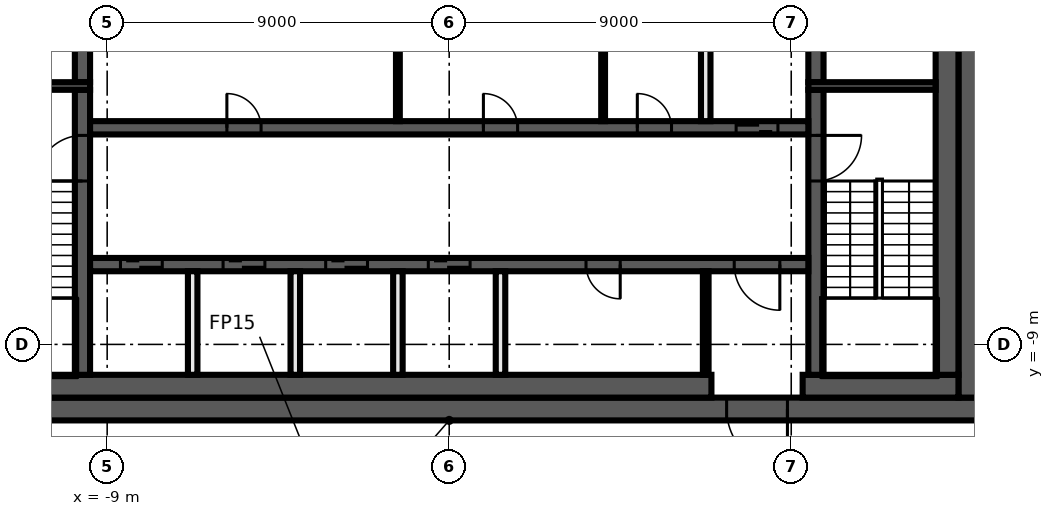
"""IFC4 building model, lengths in metres.
Left out: names, types, materials, properties, quantities, classifications, styles, units other than length and angle.
Written with IfcOpenShell. Run it as: python <this file> out.ifc"""

import sys

from ifc_helpers import new_model, si_unit, direction, frame, frame_2d, origin, place, context, subcontext, project, spatial, rectangle, extrude, element, fill, save


model = new_model("IFC4")
c1 = context("Model", 3, precision=1e-05, world=origin(), true_north=direction((0.0, 1.0)))
c2 = subcontext(c1, "Body", "Model", "MODEL_VIEW")
j1 = project(units=[si_unit("LENGTHUNIT", "METRE"), si_unit("PLANEANGLEUNIT", "RADIAN")], contexts=[c1])
p1 = place(None, origin())
s1 = spatial("IfcSite", under=j1, at=p1, CompositionType="ELEMENT")
p2 = place(p1, origin())
s2 = spatial("IfcBuilding", under=s1, at=p2, CompositionType="ELEMENT")
p3 = place(p2, frame((0.0, 0.0, 306.8)))
s3 = spatial("IfcBuildingStorey", under=s2, at=p3, CompositionType="ELEMENT", Elevation=306.8)
p4 = place(p3, frame((14.0, -10.7, 0.0), z_axis=(0.0, 0.0, 1.0), x_axis=(-1.0, 0.0, 0.0)))
e1 = element("IfcWall", 1, at=p4, inside=s3, PredefinedType="SHEAR", context=c2, shape_type="SweptSolid", body=[
    extrude(rectangle(XDim=28.0, YDim=0.6, at=frame_2d((14.0, 0.0))), origin(), (0.0, 0.0, 1.0), 3.82),
])
p5 = place(p4, frame((5.1, 0.0, 0.0)))
e2 = element("IfcOpeningElement", 2, at=p5, cuts=e1, PredefinedType="OPENING", context=c2, shape_type="SweptSolid", body=[
    extrude(rectangle(XDim=1.6, YDim=2.1, at=frame_2d((0.8, 1.05))), frame((0.0, 0.31, 0.0), z_axis=(0.0, -1.0, 0.0), x_axis=(1.0, 0.0, 0.0)), (0.0, 0.0, 1.0), 0.62),
])
p6 = place(p3, frame((13.7, 10.4, 0.0), z_axis=(0.0, 0.0, 1.0), x_axis=(0.0, -1.0, 0.0)))
e3 = element("IfcWall", 3, at=p6, inside=s3, PredefinedType="SHEAR", context=c2, shape_type="SweptSolid", body=[
    extrude(rectangle(XDim=20.8, YDim=0.6, at=frame_2d((10.4, 0.0))), origin(), (0.0, 0.0, 1.0), 3.82),
])
p7 = place(p3, frame((13.4, -10.1, 0.0), z_axis=(0.0, 0.0, 1.0), x_axis=(-1.0, 0.0, 0.0)))
e4 = element("IfcWall", 4, at=p7, inside=s3, PredefinedType="SHEAR", context=c2, shape_type="SweptSolid", body=[
    extrude(rectangle(XDim=4.1, YDim=0.6, at=frame_2d((2.05, 0.0))), origin(), (0.0, 0.0, 1.0), 3.82),
])
p8 = place(p3, frame((6.9, -10.1, 0.0), z_axis=(0.0, 0.0, 1.0), x_axis=(-1.0, 0.0, 0.0)))
e5 = element("IfcWall", 5, at=p8, inside=s3, PredefinedType="SHEAR", context=c2, shape_type="SweptSolid", body=[
    extrude(rectangle(XDim=20.3, YDim=0.6, at=frame_2d((10.15, 0.0))), origin(), (0.0, 0.0, 1.0), 3.82),
])
p9 = place(p3, frame((13.1, 9.8, 0.0), z_axis=(0.0, 0.0, 1.0), x_axis=(0.0, -1.0, 0.0)))
e6 = element("IfcWall", 6, at=p9, inside=s3, PredefinedType="SHEAR", context=c2, shape_type="SweptSolid", body=[
    extrude(rectangle(XDim=19.6, YDim=0.6, at=frame_2d((9.8, 0.0))), origin(), (0.0, 0.0, 1.0), 3.82),
])
p10 = place(p3, frame((9.65, -2.3, 0.0), z_axis=(0.0, 0.0, 1.0), x_axis=(0.0, -1.0, 0.0)))
e7 = element("IfcWall", 7, at=p10, inside=s3, PredefinedType="SHEAR", context=c2, shape_type="SweptSolid", body=[
    extrude(rectangle(XDim=7.5, YDim=0.4, at=frame_2d((3.75, 0.0))), origin(), (0.0, 0.0, 1.0), 3.82),
])
p11 = place(p10, frame((1.2, 0.0, 0.0)))
e8 = element("IfcOpeningElement", 8, at=p11, cuts=e7, PredefinedType="OPENING", context=c2, shape_type="SweptSolid", body=[
    extrude(rectangle(XDim=1.2, YDim=2.1, at=frame_2d((0.6, 1.05))), frame((0.0, 0.21, 0.0), z_axis=(0.0, -1.0, 0.0), x_axis=(1.0, 0.0, 0.0)), (0.0, 0.0, 1.0), 0.42),
])
p12 = place(p3, frame((9.65, 2.1, 0.0), z_axis=(0.0, 0.0, 1.0), x_axis=(0.0, -1.0, 0.0)))
e9 = element("IfcWall", 9, at=p12, inside=s3, PredefinedType="SHEAR", context=c2, shape_type="SweptSolid", body=[
    extrude(rectangle(XDim=4.2, YDim=0.4, at=frame_2d((2.1, 0.0))), origin(), (0.0, 0.0, 1.0), 3.82),
])
p13 = place(p12, frame((0.15, 0.0, 0.0)))
e10 = element("IfcOpeningElement", 10, at=p13, cuts=e9, PredefinedType="OPENING", context=c2, shape_type="SweptSolid", body=[
    extrude(rectangle(XDim=0.9, YDim=2.1, at=frame_2d((0.45, 1.05))), frame((0.0, 0.21, 0.0), z_axis=(0.0, -1.0, 0.0), x_axis=(1.0, 0.0, 0.0)), (0.0, 0.0, 1.0), 0.42),
])
p14 = place(p3, frame((-9.65, -9.8, 0.0), z_axis=(0.0, 0.0, 1.0), x_axis=(0.0, 1.0, 0.0)))
e11 = element("IfcWall", 11, at=p14, inside=s3, PredefinedType="SHEAR", context=c2, shape_type="SweptSolid", body=[
    extrude(rectangle(XDim=7.5, YDim=0.4, at=frame_2d((3.75, 0.0))), origin(), (0.0, 0.0, 1.0), 3.82),
])
p15 = place(p14, frame((5.1, 0.0, 0.0)))
e12 = element("IfcOpeningElement", 12, at=p15, cuts=e11, PredefinedType="OPENING", context=c2, shape_type="SweptSolid", body=[
    extrude(rectangle(XDim=1.2, YDim=2.1, at=frame_2d((0.6, 1.05))), frame((0.0, 0.21, 0.0), z_axis=(0.0, -1.0, 0.0), x_axis=(1.0, 0.0, 0.0)), (0.0, 0.0, 1.0), 0.42),
])
p16 = place(p3, frame((-9.65, -2.1, 0.0), z_axis=(0.0, 0.0, 1.0), x_axis=(0.0, 1.0, 0.0)))
e13 = element("IfcWall", 13, at=p16, inside=s3, PredefinedType="SHEAR", context=c2, shape_type="SweptSolid", body=[
    extrude(rectangle(XDim=4.2, YDim=0.4, at=frame_2d((2.1, 0.0))), origin(), (0.0, 0.0, 1.0), 3.82),
])
for number, where, z_axis, x_axis in (
    (14, (9.45, -2.2, 0.0), (0.0, 0.0, 1.0), (1.0, 0.0, 0.0)),
    (15, (-9.45, -2.2, 0.0), (0.0, 0.0, 1.0), (-1.0, 0.0, 0.0)),
):
    element("IfcWall", number, at=place(p3, frame(where, z_axis=z_axis, x_axis=x_axis)), inside=s3, PredefinedType="SHEAR", context=c2, shape_type="SweptSolid", body=[
        extrude(rectangle(XDim=3.35, YDim=0.2, at=frame_2d((1.675, 0.0))), origin(), (0.0, 0.0, 1.0), 3.82),
    ])
p17 = place(p3, frame((-9.45, -3.3, 0.0), z_axis=(0.0, 0.0, 1.0), x_axis=(1.0, 0.0, 0.0)))
e16 = element("IfcWall", 16, at=p17, inside=s3, PredefinedType="SHEAR", context=c2, shape_type="SweptSolid", body=[
    extrude(rectangle(XDim=18.9, YDim=0.35, at=frame_2d((9.45, 0.0))), origin(), (0.0, 0.0, 1.0), 3.82),
])
p18 = place(p17, frame((17.0, 0.0, 0.0)))
e17 = element("IfcOpeningElement", 17, at=p18, cuts=e16, PredefinedType="OPENING", context=c2, shape_type="SweptSolid", body=[
    extrude(rectangle(XDim=1.1, YDim=2.1, at=frame_2d((0.55, 1.05))), frame((0.0, 0.185, 0.0), z_axis=(0.0, -1.0, 0.0), x_axis=(1.0, 0.0, 0.0)), (0.0, 0.0, 1.0), 0.37),
])
p19 = place(p17, frame((3.6, 0.0, 0.0)))
e18 = element("IfcOpeningElement", 18, at=p19, cuts=e16, PredefinedType="OPENING", context=c2, shape_type="SweptSolid", body=[
    extrude(rectangle(XDim=0.9, YDim=2.1, at=frame_2d((0.45, 1.05))), frame((0.0, 0.185, 0.0), z_axis=(0.0, -1.0, 0.0), x_axis=(1.0, 0.0, 0.0)), (0.0, 0.0, 1.0), 0.37),
])
p20 = place(p17, frame((10.35, 0.0, 0.0)))
e19 = element("IfcOpeningElement", 19, at=p20, cuts=e16, PredefinedType="OPENING", context=c2, shape_type="SweptSolid", body=[
    extrude(rectangle(XDim=0.9, YDim=2.1, at=frame_2d((0.45, 1.05))), frame((0.0, 0.185, 0.0), z_axis=(0.0, -1.0, 0.0), x_axis=(1.0, 0.0, 0.0)), (0.0, 0.0, 1.0), 0.37),
])
p21 = place(p17, frame((14.4, 0.0, 0.0)))
e20 = element("IfcOpeningElement", 20, at=p21, cuts=e16, PredefinedType="OPENING", context=c2, shape_type="SweptSolid", body=[
    extrude(rectangle(XDim=0.9, YDim=2.1, at=frame_2d((0.45, 1.05))), frame((0.0, 0.185, 0.0), z_axis=(0.0, -1.0, 0.0), x_axis=(1.0, 0.0, 0.0)), (0.0, 0.0, 1.0), 0.37),
])
p22 = place(p3, frame((9.45, -6.9, 0.0), z_axis=(0.0, 0.0, 1.0), x_axis=(-1.0, 0.0, 0.0)))
e21 = element("IfcWall", 21, at=p22, inside=s3, PredefinedType="SHEAR", context=c2, shape_type="SweptSolid", body=[
    extrude(rectangle(XDim=18.9, YDim=0.35, at=frame_2d((9.45, 0.0))), origin(), (0.0, 0.0, 1.0), 3.82),
])
p23 = place(p22, frame((17.0, 0.0, 0.0)))
e22 = element("IfcOpeningElement", 22, at=p23, cuts=e21, PredefinedType="OPENING", context=c2, shape_type="SweptSolid", body=[
    extrude(rectangle(XDim=1.1, YDim=2.1, at=frame_2d((0.55, 1.05))), frame((0.0, 0.185, 0.0), z_axis=(0.0, -1.0, 0.0), x_axis=(1.0, 0.0, 0.0)), (0.0, 0.0, 1.0), 0.37),
])
p24 = place(p22, frame((14.3, 0.0, 0.0)))
e23 = element("IfcOpeningElement", 23, at=p24, cuts=e21, PredefinedType="OPENING", context=c2, shape_type="SweptSolid", body=[
    extrude(rectangle(XDim=1.1, YDim=2.1, at=frame_2d((0.55, 1.05))), frame((0.0, 0.185, 0.0), z_axis=(0.0, -1.0, 0.0), x_axis=(1.0, 0.0, 0.0)), (0.0, 0.0, 1.0), 0.37),
])
p25 = place(p22, frame((11.6, 0.0, 0.0)))
e24 = element("IfcOpeningElement", 24, at=p25, cuts=e21, PredefinedType="OPENING", context=c2, shape_type="SweptSolid", body=[
    extrude(rectangle(XDim=1.1, YDim=2.1, at=frame_2d((0.55, 1.05))), frame((0.0, 0.185, 0.0), z_axis=(0.0, -1.0, 0.0), x_axis=(1.0, 0.0, 0.0)), (0.0, 0.0, 1.0), 0.37),
])
p26 = place(p22, frame((8.9, 0.0, 0.0)))
e25 = element("IfcOpeningElement", 25, at=p26, cuts=e21, PredefinedType="OPENING", context=c2, shape_type="SweptSolid", body=[
    extrude(rectangle(XDim=1.1, YDim=2.1, at=frame_2d((0.55, 1.05))), frame((0.0, 0.185, 0.0), z_axis=(0.0, -1.0, 0.0), x_axis=(1.0, 0.0, 0.0)), (0.0, 0.0, 1.0), 0.37),
])
p27 = place(p22, frame((0.75, 0.0, 0.0)))
e26 = element("IfcOpeningElement", 26, at=p27, cuts=e21, PredefinedType="OPENING", context=c2, shape_type="SweptSolid", body=[
    extrude(rectangle(XDim=1.2, YDim=2.1, at=frame_2d((0.6, 1.05))), frame((0.0, 0.185, 0.0), z_axis=(0.0, -1.0, 0.0), x_axis=(1.0, 0.0, 0.0)), (0.0, 0.0, 1.0), 0.37),
])
p28 = place(p22, frame((4.95, 0.0, 0.0)))
e27 = element("IfcOpeningElement", 27, at=p28, cuts=e21, PredefinedType="OPENING", context=c2, shape_type="SweptSolid", body=[
    extrude(rectangle(XDim=0.9, YDim=2.1, at=frame_2d((0.45, 1.05))), frame((0.0, 0.185, 0.0), z_axis=(0.0, -1.0, 0.0), x_axis=(1.0, 0.0, 0.0)), (0.0, 0.0, 1.0), 0.37),
])
p29 = place(p3, frame((6.75, -9.8, 0.0), z_axis=(0.0, 0.0, 1.0), x_axis=(0.0, 1.0, 0.0)))
e28 = element("IfcWall", 28, at=p29, inside=s3, PredefinedType="PARTITIONING", context=c2, shape_type="SweptSolid", body=[
    extrude(rectangle(XDim=2.725, YDim=0.15, at=frame_2d((1.363, 0.0))), origin(), (0.0, 0.0, 1.0), 3.82),
])
p30 = place(p3, frame((6.75, -3.125, 0.0), z_axis=(0.0, 0.0, 1.0), x_axis=(0.0, 1.0, 0.0)))
e29 = element("IfcWall", 29, at=p30, inside=s3, PredefinedType="SOLIDWALL", context=c2, shape_type="SweptSolid", body=[
    extrude(rectangle(XDim=2.725, YDim=0.25, at=frame_2d((1.363, 0.0))), origin(), (0.0, 0.0, 1.0), 3.82),
])
p31 = place(p3, frame((4.05, -3.125, 0.0), z_axis=(0.0, 0.0, 1.0), x_axis=(0.0, 1.0, 0.0)))
e30 = element("IfcWall", 30, at=p31, inside=s3, PredefinedType="PARTITIONING", context=c2, shape_type="SweptSolid", body=[
    extrude(rectangle(XDim=2.725, YDim=0.1, at=frame_2d((1.363, 0.0))), origin(), (0.0, 0.0, 1.0), 3.82),
])
p32 = place(p3, frame((1.35, -9.8, 0.0), z_axis=(0.0, 0.0, 1.0), x_axis=(0.0, 1.0, 0.0)))
e31 = element("IfcWall", 31, at=p32, inside=s3, PredefinedType="SOLIDWALL", context=c2, shape_type="SweptSolid", body=[
    extrude(rectangle(XDim=2.725, YDim=0.25, at=frame_2d((1.363, 0.0))), origin(), (0.0, 0.0, 1.0), 3.82),
])
p33 = place(p3, frame((-1.35, -3.125, 0.0), z_axis=(0.0, 0.0, 1.0), x_axis=(0.0, 1.0, 0.0)))
e32 = element("IfcWall", 32, at=p33, inside=s3, PredefinedType="PARTITIONING", context=c2, shape_type="SweptSolid", body=[
    extrude(rectangle(XDim=2.725, YDim=0.1, at=frame_2d((1.363, 0.0))), origin(), (0.0, 0.0, 1.0), 3.82),
])
for number, where, z_axis, x_axis in (
    (33, (-1.35, -9.8, 0.0), (0.0, 0.0, 1.0), (0.0, 1.0, 0.0)),
    (34, (-4.05, -9.8, 0.0), (0.0, 0.0, 1.0), (0.0, 1.0, 0.0)),
    (35, (-6.75, -9.8, 0.0), (0.0, 0.0, 1.0), (0.0, 1.0, 0.0)),
):
    element("IfcWall", number, at=place(p3, frame(where, z_axis=z_axis, x_axis=x_axis)), inside=s3, PredefinedType="SOLIDWALL", context=c2, shape_type="SweptSolid", body=[
        extrude(rectangle(XDim=2.725, YDim=0.25, at=frame_2d((1.363, 0.0))), origin(), (0.0, 0.0, 1.0), 3.82),
    ])
p34 = place(p18, origin())
e36 = element("IfcDoor", 36, at=p34, inside=s3, OperationType="DOUBLE_DOOR_SLIDING", PredefinedType="DOOR", context=c2, shape_type="SweptSolid", body=[
    extrude(rectangle(XDim=1.1, YDim=2.1, at=frame_2d((0.55, 1.05))), frame((0.0, 0.025, 0.0), z_axis=(0.0, -1.0, 0.0), x_axis=(1.0, 0.0, 0.0)), (0.0, 0.0, 1.0), 0.05),
])
fill(e17, e36)
p35 = place(p23, origin())
e37 = element("IfcDoor", 37, at=p35, inside=s3, OperationType="DOUBLE_DOOR_SLIDING", PredefinedType="DOOR", context=c2, shape_type="SweptSolid", body=[
    extrude(rectangle(XDim=1.1, YDim=2.1, at=frame_2d((0.55, 1.05))), frame((0.0, 0.025, 0.0), z_axis=(0.0, -1.0, 0.0), x_axis=(1.0, 0.0, 0.0)), (0.0, 0.0, 1.0), 0.05),
])
fill(e22, e37)
p36 = place(p24, origin())
e38 = element("IfcDoor", 38, at=p36, inside=s3, OperationType="DOUBLE_DOOR_SLIDING", PredefinedType="DOOR", context=c2, shape_type="SweptSolid", body=[
    extrude(rectangle(XDim=1.1, YDim=2.1, at=frame_2d((0.55, 1.05))), frame((0.0, 0.025, 0.0), z_axis=(0.0, -1.0, 0.0), x_axis=(1.0, 0.0, 0.0)), (0.0, 0.0, 1.0), 0.05),
])
fill(e23, e38)
p37 = place(p25, origin())
e39 = element("IfcDoor", 39, at=p37, inside=s3, OperationType="DOUBLE_DOOR_SLIDING", PredefinedType="DOOR", context=c2, shape_type="SweptSolid", body=[
    extrude(rectangle(XDim=1.1, YDim=2.1, at=frame_2d((0.55, 1.05))), frame((0.0, 0.025, 0.0), z_axis=(0.0, -1.0, 0.0), x_axis=(1.0, 0.0, 0.0)), (0.0, 0.0, 1.0), 0.05),
])
fill(e24, e39)
p38 = place(p26, origin())
e40 = element("IfcDoor", 40, at=p38, inside=s3, OperationType="DOUBLE_DOOR_SLIDING", PredefinedType="DOOR", context=c2, shape_type="SweptSolid", body=[
    extrude(rectangle(XDim=1.1, YDim=2.1, at=frame_2d((0.55, 1.05))), frame((0.0, 0.025, 0.0), z_axis=(0.0, -1.0, 0.0), x_axis=(1.0, 0.0, 0.0)), (0.0, 0.0, 1.0), 0.05),
])
fill(e25, e40)
p39 = place(p5, origin())
e41 = element("IfcDoor", 41, at=p39, inside=s3, OperationType="DOUBLE_DOOR_SINGLE_SWING", PredefinedType="DOOR", context=c2, shape_type="SweptSolid", body=[
    extrude(rectangle(XDim=1.6, YDim=2.1, at=frame_2d((0.8, 1.05))), frame((0.0, 0.025, 0.0), z_axis=(0.0, -1.0, 0.0), x_axis=(1.0, 0.0, 0.0)), (0.0, 0.0, 1.0), 0.05),
])
fill(e2, e41)
p40 = place(p27, origin())
e42 = element("IfcDoor", 42, at=p40, inside=s3, OperationType="SINGLE_SWING_LEFT", PredefinedType="DOOR", context=c2, shape_type="SweptSolid", body=[
    extrude(rectangle(XDim=1.2, YDim=2.1, at=frame_2d((0.6, 1.05))), frame((0.0, 0.025, 0.0), z_axis=(0.0, -1.0, 0.0), x_axis=(1.0, 0.0, 0.0)), (0.0, 0.0, 1.0), 0.05),
])
fill(e26, e42)
p41 = place(p19, origin())
e43 = element("IfcDoor", 43, at=p41, inside=s3, OperationType="SINGLE_SWING_RIGHT", PredefinedType="DOOR", context=c2, shape_type="SweptSolid", body=[
    extrude(rectangle(XDim=0.9, YDim=2.1, at=frame_2d((0.45, 1.05))), frame((0.0, 0.025, 0.0), z_axis=(0.0, -1.0, 0.0), x_axis=(1.0, 0.0, 0.0)), (0.0, 0.0, 1.0), 0.05),
])
fill(e18, e43)
p42 = place(p20, origin())
e44 = element("IfcDoor", 44, at=p42, inside=s3, OperationType="SINGLE_SWING_LEFT", PredefinedType="DOOR", context=c2, shape_type="SweptSolid", body=[
    extrude(rectangle(XDim=0.9, YDim=2.1, at=frame_2d((0.45, 1.05))), frame((0.0, 0.025, 0.0), z_axis=(0.0, -1.0, 0.0), x_axis=(1.0, 0.0, 0.0)), (0.0, 0.0, 1.0), 0.05),
])
fill(e19, e44)
p43 = place(p21, origin())
e45 = element("IfcDoor", 45, at=p43, inside=s3, OperationType="SINGLE_SWING_RIGHT", PredefinedType="DOOR", context=c2, shape_type="SweptSolid", body=[
    extrude(rectangle(XDim=0.9, YDim=2.1, at=frame_2d((0.45, 1.05))), frame((0.0, 0.025, 0.0), z_axis=(0.0, -1.0, 0.0), x_axis=(1.0, 0.0, 0.0)), (0.0, 0.0, 1.0), 0.05),
])
fill(e20, e45)
p44 = place(p28, origin())
e46 = element("IfcDoor", 46, at=p44, inside=s3, OperationType="SINGLE_SWING_LEFT", PredefinedType="DOOR", context=c2, shape_type="SweptSolid", body=[
    extrude(rectangle(XDim=0.9, YDim=2.1, at=frame_2d((0.45, 1.05))), frame((0.0, 0.025, 0.0), z_axis=(0.0, -1.0, 0.0), x_axis=(1.0, 0.0, 0.0)), (0.0, 0.0, 1.0), 0.05),
])
fill(e27, e46)
p45 = place(p11, origin())
e47 = element("IfcDoor", 47, at=p45, inside=s3, OperationType="SINGLE_SWING_RIGHT", PredefinedType="DOOR", context=c2, shape_type="SweptSolid", body=[
    extrude(rectangle(XDim=1.2, YDim=2.1, at=frame_2d((0.6, 1.05))), frame((0.0, 0.025, 0.0), z_axis=(0.0, -1.0, 0.0), x_axis=(1.0, 0.0, 0.0)), (0.0, 0.0, 1.0), 0.05),
])
fill(e8, e47)
p46 = place(p15, origin())
e48 = element("IfcDoor", 48, at=p46, inside=s3, OperationType="SINGLE_SWING_LEFT", PredefinedType="DOOR", context=c2, shape_type="SweptSolid", body=[
    extrude(rectangle(XDim=1.2, YDim=2.1, at=frame_2d((0.6, 1.05))), frame((0.0, 0.025, 0.0), z_axis=(0.0, -1.0, 0.0), x_axis=(1.0, 0.0, 0.0)), (0.0, 0.0, 1.0), 0.05),
])
fill(e12, e48)
save(model, sys.argv[1])
